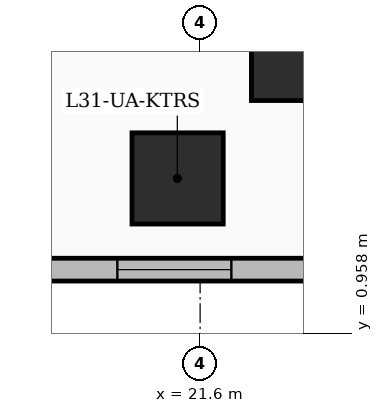
"""IFC4 building model, lengths in metres.
Left out: names, types, materials, properties, quantities, classifications, styles, units other than length and angle.
Written with IfcOpenShell. Run it as: python <this file> out.ifc"""

import sys

from ifc_helpers import new_model, si_unit, direction, frame, frame_2d, origin, origin_2d, place, context, subcontext, project, spatial, rectangle, extrude, element, fill, save


model = new_model("IFC4")
c1 = context("Model", 3, precision=1e-05, world=origin(), true_north=direction((0.0, 1.0)))
c2 = subcontext(c1, "Body", "Model", "MODEL_VIEW")
j1 = project(units=[si_unit("LENGTHUNIT", "METRE"), si_unit("PLANEANGLEUNIT", "RADIAN")], contexts=[c1])
p1 = place(None, origin())
s1 = spatial("IfcSite", under=j1, at=p1, CompositionType="ELEMENT")
p2 = place(p1, origin())
s2 = spatial("IfcBuilding", under=s1, at=p2, CompositionType="ELEMENT")
p3 = place(p2, frame((0.0, 0.0, 124.8)))
s3 = spatial("IfcBuildingStorey", under=s2, at=p3, CompositionType="ELEMENT", Elevation=124.8)
p4 = place(p3, frame((22.8, 4.55, 0.0), z_axis=(0.0, 0.0, 1.0), x_axis=(1.0, 0.0, 0.0)))
e1 = element("IfcColumn", 1, at=p4, inside=s3, PredefinedType="COLUMN", context=c2, shape_type="SweptSolid", body=[
    extrude(rectangle(XDim=1.05, YDim=1.05, at=origin_2d()), origin(), (0.0, 0.0, 1.0), 3.6),
])
p5 = place(p3, frame((21.304, 3.0, 0.0), z_axis=(0.0, 0.0, 1.0), x_axis=(1.0, 0.0, 0.0)))
e2 = element("IfcColumn", 2, at=p5, inside=s3, PredefinedType="COLUMN", context=c2, shape_type="SweptSolid", body=[
    extrude(rectangle(XDim=1.2, YDim=1.2, at=origin_2d()), origin(), (0.0, 0.0, 1.0), 3.6),
])
p6 = place(p3, frame((25.036, 1.8, 0.0), z_axis=(0.0, 0.0, 1.0), x_axis=(-1.0, 0.0, 0.0)))
e3 = element("IfcWall", 3, at=p6, inside=s3, PredefinedType="SOLIDWALL", context=c2, shape_type="SweptSolid", body=[
    extrude(rectangle(XDim=5.788, YDim=0.3, at=frame_2d((2.894, 0.0))), origin(), (0.0, 0.0, 1.0), 3.35),
])
p7 = place(p6, frame((3.025, 0.0, 0.6)))
e4 = element("IfcOpeningElement", 4, at=p7, cuts=e3, PredefinedType="OPENING", context=c2, shape_type="SweptSolid", body=[
    extrude(rectangle(XDim=1.5, YDim=2.1, at=frame_2d((0.75, 1.05))), frame((0.0, 0.16, 0.0), z_axis=(0.0, -1.0, 0.0), x_axis=(1.0, 0.0, 0.0)), (0.0, 0.0, 1.0), 0.32),
])
p8 = place(p6, frame((0.675, 0.0, 0.8)))
e5 = element("IfcOpeningElement", 5, at=p8, cuts=e3, PredefinedType="OPENING", context=c2, shape_type="SweptSolid", body=[
    extrude(rectangle(XDim=1.2, YDim=1.8, at=frame_2d((0.6, 0.9))), frame((0.0, 0.16, 0.0), z_axis=(0.0, -1.0, 0.0), x_axis=(1.0, 0.0, 0.0)), (0.0, 0.0, 1.0), 0.32),
])
p9 = place(p3, frame((22.8, 8.43, 0.0), z_axis=(0.0, 0.0, 1.0), x_axis=(0.0, -1.0, 0.0)))
e6 = element("IfcWall", 6, at=p9, inside=s3, PredefinedType="PARTITIONING", context=c2, shape_type="SweptSolid", body=[
    extrude(rectangle(XDim=4.11, YDim=0.125, at=frame_2d((2.055, 0.0))), origin(), (0.0, 0.0, 1.0), 3.35),
])
p10 = place(p3, frame((22.847, 4.32, 0.0), z_axis=(0.0, 0.0, 1.0), x_axis=(1.0, 0.0, 0.0)))
e7 = element("IfcWall", 7, at=p10, inside=s3, PredefinedType="PARTITIONING", context=c2, shape_type="SweptSolid", body=[
    extrude(rectangle(XDim=4.328, YDim=0.15, at=frame_2d((2.164, 0.0))), origin(), (0.0, 0.0, 1.0), 2.436),
])
p11 = place(p7, origin())
e8 = element("IfcWindow", 8, at=p11, inside=s3, PartitioningType="SINGLE_PANEL", PredefinedType="WINDOW", context=c2, shape_type="SweptSolid", body=[
    extrude(rectangle(XDim=1.5, YDim=2.1, at=frame_2d((0.75, 1.05))), frame((0.0, 0.03, 0.0), z_axis=(0.0, -1.0, 0.0), x_axis=(1.0, 0.0, 0.0)), (0.0, 0.0, 1.0), 0.06),
])
fill(e4, e8)
save(model, sys.argv[1])
